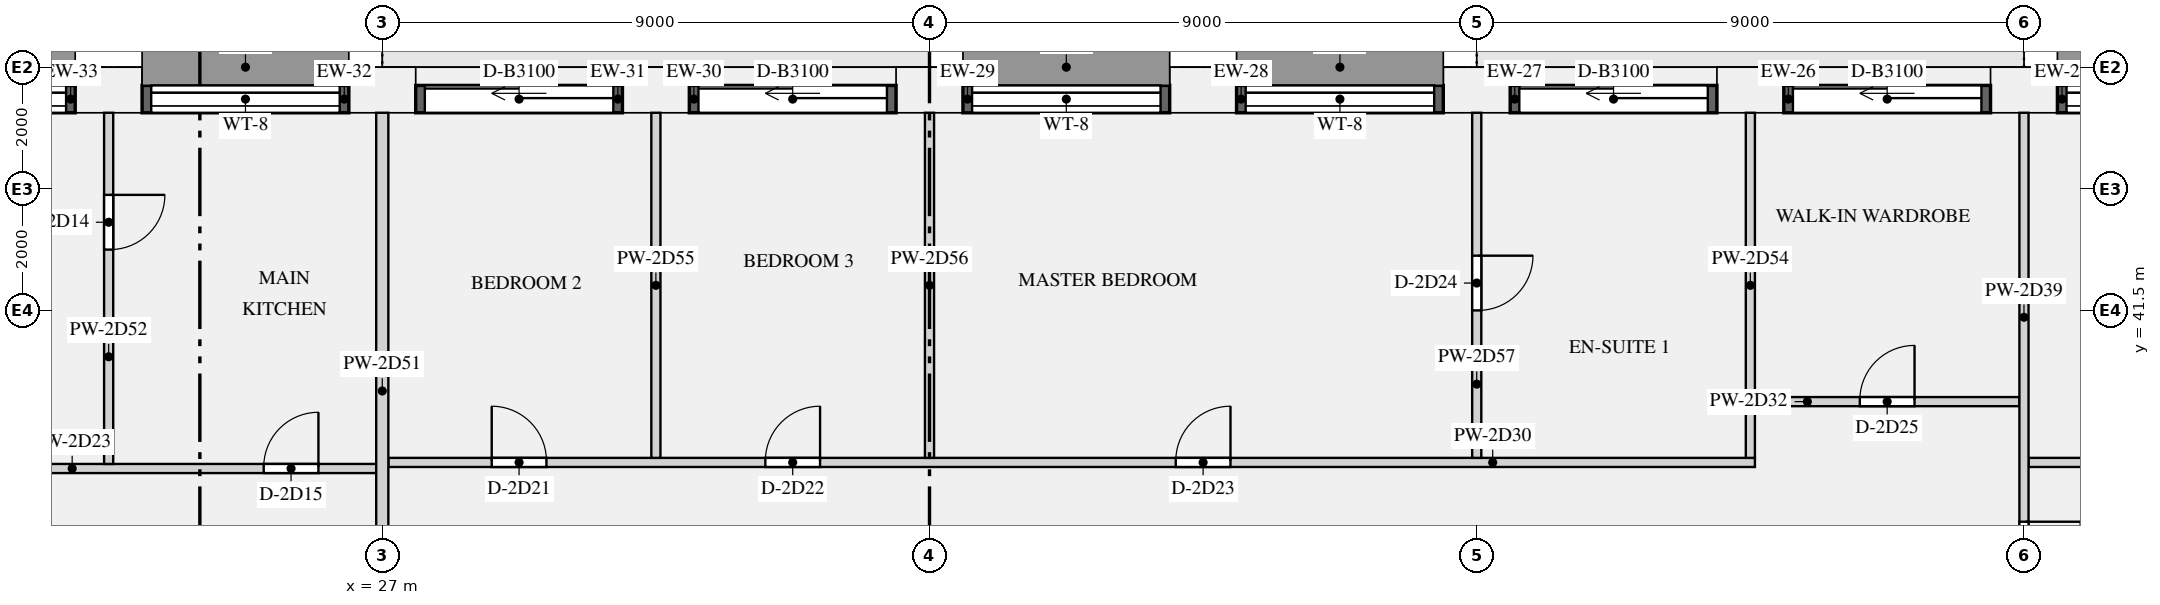
"""IFC4 building model, lengths in metres.
Left out: names, types, materials, properties, quantities, classifications, styles, units other than length and angle.
Written with IfcOpenShell. Run it as: python <this file> out.ifc"""

import sys

from ifc_helpers import new_model, si_unit, direction, frame, frame_2d, origin, origin_2d, place, context, subcontext, project, spatial, rectangle, extrude, element, fill, save


model = new_model("IFC4")
c1 = context("Model", 3, precision=1e-05, world=origin(), true_north=direction((0.0, 1.0)))
c2 = subcontext(c1, "Body", "Model", "MODEL_VIEW")
j1 = project(units=[si_unit("LENGTHUNIT", "METRE"), si_unit("PLANEANGLEUNIT", "RADIAN")], contexts=[c1])
p1 = place(None, origin())
s1 = spatial("IfcSite", under=j1, at=p1, CompositionType="ELEMENT")
p2 = place(p1, origin())
s2 = spatial("IfcBuilding", under=s1, at=p2, CompositionType="ELEMENT")
p3 = place(p2, frame((0.0, 0.0, 111.9)))
s3 = spatial("IfcBuildingStorey", under=s2, at=p3, CompositionType="ELEMENT", Elevation=111.9)
for number, where, z_axis, x_axis in (
    (1, (54.0, 45.125, 0.0), (0.0, 0.0, 1.0), (-1.0, 0.0, 0.0)),
    (2, (49.5, 45.125, 0.0), (0.0, 0.0, 1.0), (-1.0, 0.0, 0.0)),
    (3, (45.0, 45.125, 0.0), (0.0, 0.0, 1.0), (-1.0, 0.0, 0.0)),
    (4, (40.5, 45.125, 0.0), (0.0, 0.0, 1.0), (-1.0, 0.0, 0.0)),
    (5, (36.0, 45.125, 0.0), (0.0, 0.0, 1.0), (-1.0, 0.0, 0.0)),
    (6, (31.5, 45.125, 0.0), (0.0, 0.0, 1.0), (-1.0, 0.0, 0.0)),
    (7, (27.0, 45.125, 0.0), (0.0, 0.0, 1.0), (-1.0, 0.0, 0.0)),
    (8, (22.5, 45.125, 0.0), (0.0, 0.0, 1.0), (-1.0, 0.0, 0.0)),
):
    element("IfcColumn", number, at=place(p3, frame(where, z_axis=z_axis, x_axis=x_axis)), inside=s3, PredefinedType="USERDEFINED", context=c2, shape_type="SweptSolid", body=[
        extrude(rectangle(XDim=1.1, YDim=0.75, at=origin_2d()), origin(), (0.0, 0.0, 1.0), 3.15),
    ])
p4 = place(p3, frame((57.95, 44.975, 0.9), z_axis=(0.0, 0.0, 1.0), x_axis=(-1.0, 0.0, 0.0)))
e9 = element("IfcWall", 9, at=p4, inside=s3, PredefinedType="SOLIDWALL", context=c2, shape_type="SweptSolid", body=[
    extrude(rectangle(XDim=3.4, YDim=0.45, at=frame_2d((1.7, 0.0))), origin(), (0.0, 0.0, 1.0), 1.93),
])
p5 = place(p4, frame((0.15, 0.0, 0.15)))
e10 = element("IfcOpeningElement", 10, at=p5, cuts=e9, PredefinedType="OPENING", context=c2, shape_type="SweptSolid", body=[
    extrude(rectangle(XDim=3.1, YDim=1.5, at=frame_2d((1.55, 0.75))), frame((0.0, 0.235, 0.0), z_axis=(0.0, -1.0, 0.0), x_axis=(1.0, 0.0, 0.0)), (0.0, 0.0, 1.0), 0.47),
])
p6 = place(p3, frame((53.45, 44.975, 0.0), z_axis=(0.0, 0.0, 1.0), x_axis=(-1.0, 0.0, 0.0)))
e11 = element("IfcWall", 11, at=p6, inside=s3, PredefinedType="SOLIDWALL", context=c2, shape_type="SweptSolid", body=[
    extrude(rectangle(XDim=3.4, YDim=0.45, at=frame_2d((1.7, 0.0))), origin(), (0.0, 0.0, 1.0), 2.83),
])
p7 = place(p6, frame((0.15, 0.0, 0.0)))
e12 = element("IfcOpeningElement", 12, at=p7, cuts=e11, PredefinedType="OPENING", context=c2, shape_type="SweptSolid", body=[
    extrude(rectangle(XDim=3.1, YDim=2.3, at=frame_2d((1.55, 1.15))), frame((0.0, 0.235, 0.0), z_axis=(0.0, -1.0, 0.0), x_axis=(1.0, 0.0, 0.0)), (0.0, 0.0, 1.0), 0.47),
])
p8 = place(p3, frame((48.95, 44.975, 0.0), z_axis=(0.0, 0.0, 1.0), x_axis=(-1.0, 0.0, 0.0)))
e13 = element("IfcWall", 13, at=p8, inside=s3, PredefinedType="SOLIDWALL", context=c2, shape_type="SweptSolid", body=[
    extrude(rectangle(XDim=3.4, YDim=0.45, at=frame_2d((1.7, 0.0))), origin(), (0.0, 0.0, 1.0), 2.83),
])
p9 = place(p8, frame((0.15, 0.0, 0.0)))
e14 = element("IfcOpeningElement", 14, at=p9, cuts=e13, PredefinedType="OPENING", context=c2, shape_type="SweptSolid", body=[
    extrude(rectangle(XDim=3.1, YDim=2.3, at=frame_2d((1.55, 1.15))), frame((0.0, 0.235, 0.0), z_axis=(0.0, -1.0, 0.0), x_axis=(1.0, 0.0, 0.0)), (0.0, 0.0, 1.0), 0.47),
])
p10 = place(p3, frame((44.45, 44.975, 0.9), z_axis=(0.0, 0.0, 1.0), x_axis=(-1.0, 0.0, 0.0)))
e15 = element("IfcWall", 15, at=p10, inside=s3, PredefinedType="SOLIDWALL", context=c2, shape_type="SweptSolid", body=[
    extrude(rectangle(XDim=3.4, YDim=0.45, at=frame_2d((1.7, 0.0))), origin(), (0.0, 0.0, 1.0), 1.93),
])
p11 = place(p10, frame((0.15, 0.0, 0.15)))
e16 = element("IfcOpeningElement", 16, at=p11, cuts=e15, PredefinedType="OPENING", context=c2, shape_type="SweptSolid", body=[
    extrude(rectangle(XDim=3.1, YDim=1.5, at=frame_2d((1.55, 0.75))), frame((0.0, 0.235, 0.0), z_axis=(0.0, -1.0, 0.0), x_axis=(1.0, 0.0, 0.0)), (0.0, 0.0, 1.0), 0.47),
])
p12 = place(p3, frame((39.95, 44.975, 0.9), z_axis=(0.0, 0.0, 1.0), x_axis=(-1.0, 0.0, 0.0)))
e17 = element("IfcWall", 17, at=p12, inside=s3, PredefinedType="SOLIDWALL", context=c2, shape_type="SweptSolid", body=[
    extrude(rectangle(XDim=3.4, YDim=0.45, at=frame_2d((1.7, 0.0))), origin(), (0.0, 0.0, 1.0), 1.93),
])
p13 = place(p12, frame((0.15, 0.0, 0.15)))
e18 = element("IfcOpeningElement", 18, at=p13, cuts=e17, PredefinedType="OPENING", context=c2, shape_type="SweptSolid", body=[
    extrude(rectangle(XDim=3.1, YDim=1.5, at=frame_2d((1.55, 0.75))), frame((0.0, 0.235, 0.0), z_axis=(0.0, -1.0, 0.0), x_axis=(1.0, 0.0, 0.0)), (0.0, 0.0, 1.0), 0.47),
])
p14 = place(p3, frame((35.45, 44.975, 0.0), z_axis=(0.0, 0.0, 1.0), x_axis=(-1.0, 0.0, 0.0)))
e19 = element("IfcWall", 19, at=p14, inside=s3, PredefinedType="SOLIDWALL", context=c2, shape_type="SweptSolid", body=[
    extrude(rectangle(XDim=3.4, YDim=0.45, at=frame_2d((1.7, 0.0))), origin(), (0.0, 0.0, 1.0), 2.83),
])
p15 = place(p14, frame((0.15, 0.0, 0.0)))
e20 = element("IfcOpeningElement", 20, at=p15, cuts=e19, PredefinedType="OPENING", context=c2, shape_type="SweptSolid", body=[
    extrude(rectangle(XDim=3.1, YDim=2.3, at=frame_2d((1.55, 1.15))), frame((0.0, 0.235, 0.0), z_axis=(0.0, -1.0, 0.0), x_axis=(1.0, 0.0, 0.0)), (0.0, 0.0, 1.0), 0.47),
])
p16 = place(p3, frame((30.95, 44.975, 0.0), z_axis=(0.0, 0.0, 1.0), x_axis=(-1.0, 0.0, 0.0)))
e21 = element("IfcWall", 21, at=p16, inside=s3, PredefinedType="SOLIDWALL", context=c2, shape_type="SweptSolid", body=[
    extrude(rectangle(XDim=3.4, YDim=0.45, at=frame_2d((1.7, 0.0))), origin(), (0.0, 0.0, 1.0), 2.83),
])
p17 = place(p16, frame((0.15, 0.0, 0.0)))
e22 = element("IfcOpeningElement", 22, at=p17, cuts=e21, PredefinedType="OPENING", context=c2, shape_type="SweptSolid", body=[
    extrude(rectangle(XDim=3.1, YDim=2.3, at=frame_2d((1.55, 1.15))), frame((0.0, 0.235, 0.0), z_axis=(0.0, -1.0, 0.0), x_axis=(1.0, 0.0, 0.0)), (0.0, 0.0, 1.0), 0.47),
])
p18 = place(p3, frame((26.45, 44.975, 0.9), z_axis=(0.0, 0.0, 1.0), x_axis=(-1.0, 0.0, 0.0)))
e23 = element("IfcWall", 23, at=p18, inside=s3, PredefinedType="SOLIDWALL", context=c2, shape_type="SweptSolid", body=[
    extrude(rectangle(XDim=3.4, YDim=0.45, at=frame_2d((1.7, 0.0))), origin(), (0.0, 0.0, 1.0), 1.93),
])
p19 = place(p18, frame((0.15, 0.0, 0.15)))
e24 = element("IfcOpeningElement", 24, at=p19, cuts=e23, PredefinedType="OPENING", context=c2, shape_type="SweptSolid", body=[
    extrude(rectangle(XDim=3.1, YDim=1.5, at=frame_2d((1.55, 0.75))), frame((0.0, 0.235, 0.0), z_axis=(0.0, -1.0, 0.0), x_axis=(1.0, 0.0, 0.0)), (0.0, 0.0, 1.0), 0.47),
])
p20 = place(p3, frame((21.95, 44.975, 0.9), z_axis=(0.0, 0.0, 1.0), x_axis=(-1.0, 0.0, 0.0)))
e25 = element("IfcWall", 25, at=p20, inside=s3, PredefinedType="SOLIDWALL", context=c2, shape_type="SweptSolid", body=[
    extrude(rectangle(XDim=3.4, YDim=0.45, at=frame_2d((1.7, 0.0))), origin(), (0.0, 0.0, 1.0), 1.93),
])
p21 = place(p20, frame((0.15, 0.0, 0.15)))
e26 = element("IfcOpeningElement", 26, at=p21, cuts=e25, PredefinedType="OPENING", context=c2, shape_type="SweptSolid", body=[
    extrude(rectangle(XDim=3.1, YDim=1.5, at=frame_2d((1.55, 0.75))), frame((0.0, 0.235, 0.0), z_axis=(0.0, -1.0, 0.0), x_axis=(1.0, 0.0, 0.0)), (0.0, 0.0, 1.0), 0.47),
])
p22 = place(p3, frame((13.425, 38.9, 0.0), z_axis=(0.0, 0.0, 1.0), x_axis=(1.0, 0.0, 0.0)))
e27 = element("IfcWall", 27, at=p22, inside=s3, PredefinedType="PARTITIONING", context=c2, shape_type="SweptSolid", body=[
    extrude(rectangle(XDim=13.475, YDim=0.15, at=frame_2d((6.737, 0.0))), origin(), (0.0, 0.0, 1.0), 2.83),
])
p23 = place(p22, frame((3.825, 0.0, 0.0)))
e28 = element("IfcOpeningElement", 28, at=p23, cuts=e27, PredefinedType="OPENING", context=c2, shape_type="SweptSolid", body=[
    extrude(rectangle(XDim=1.5, YDim=2.1, at=frame_2d((0.75, 1.05))), frame((0.0, 0.085, 0.0), z_axis=(0.0, -1.0, 0.0), x_axis=(1.0, 0.0, 0.0)), (0.0, 0.0, 1.0), 0.17),
])
p24 = place(p22, frame((11.625, 0.0, 0.0)))
e29 = element("IfcOpeningElement", 29, at=p24, cuts=e27, PredefinedType="OPENING", context=c2, shape_type="SweptSolid", body=[
    extrude(rectangle(XDim=0.9, YDim=2.1, at=frame_2d((0.45, 1.05))), frame((0.0, 0.085, 0.0), z_axis=(0.0, -1.0, 0.0), x_axis=(1.0, 0.0, 0.0)), (0.0, 0.0, 1.0), 0.17),
])
p25 = place(p3, frame((27.1, 39.0, 0.0), z_axis=(0.0, 0.0, 1.0), x_axis=(1.0, 0.0, 0.0)))
e30 = element("IfcWall", 30, at=p25, inside=s3, PredefinedType="PARTITIONING", context=c2, shape_type="SweptSolid", body=[
    extrude(rectangle(XDim=22.475, YDim=0.15, at=frame_2d((11.237, 0.0))), origin(), (0.0, 0.0, 1.0), 2.83),
])
p26 = place(p25, frame((1.7, 0.0, 0.0)))
e31 = element("IfcOpeningElement", 31, at=p26, cuts=e30, PredefinedType="OPENING", context=c2, shape_type="SweptSolid", body=[
    extrude(rectangle(XDim=0.9, YDim=2.1, at=frame_2d((0.45, 1.05))), frame((0.0, 0.085, 0.0), z_axis=(0.0, -1.0, 0.0), x_axis=(1.0, 0.0, 0.0)), (0.0, 0.0, 1.0), 0.17),
])
p27 = place(p25, frame((6.2, 0.0, 0.0)))
e32 = element("IfcOpeningElement", 32, at=p27, cuts=e30, PredefinedType="OPENING", context=c2, shape_type="SweptSolid", body=[
    extrude(rectangle(XDim=0.9, YDim=2.1, at=frame_2d((0.45, 1.05))), frame((0.0, 0.085, 0.0), z_axis=(0.0, -1.0, 0.0), x_axis=(1.0, 0.0, 0.0)), (0.0, 0.0, 1.0), 0.17),
])
p28 = place(p25, frame((12.95, 0.0, 0.0)))
e33 = element("IfcOpeningElement", 33, at=p28, cuts=e30, PredefinedType="OPENING", context=c2, shape_type="SweptSolid", body=[
    extrude(rectangle(XDim=0.9, YDim=2.1, at=frame_2d((0.45, 1.05))), frame((0.0, 0.085, 0.0), z_axis=(0.0, -1.0, 0.0), x_axis=(1.0, 0.0, 0.0)), (0.0, 0.0, 1.0), 0.17),
])
p29 = place(p3, frame((54.075, 39.0, 0.0), z_axis=(0.0, 0.0, 1.0), x_axis=(1.0, 0.0, 0.0)))
e34 = element("IfcWall", 34, at=p29, inside=s3, PredefinedType="PARTITIONING", context=c2, shape_type="SweptSolid", body=[
    extrude(rectangle(XDim=8.85, YDim=0.15, at=frame_2d((4.425, 0.0))), origin(), (0.0, 0.0, 1.0), 2.83),
])
p30 = place(p29, frame((3.975, 0.0, 0.0)))
e35 = element("IfcOpeningElement", 35, at=p30, cuts=e34, PredefinedType="OPENING", context=c2, shape_type="SweptSolid", body=[
    extrude(rectangle(XDim=0.9, YDim=2.1, at=frame_2d((0.45, 1.05))), frame((0.0, 0.085, 0.0), z_axis=(0.0, -1.0, 0.0), x_axis=(1.0, 0.0, 0.0)), (0.0, 0.0, 1.0), 0.17),
])
p31 = place(p3, frame((49.575, 40.0, 0.0), z_axis=(0.0, 0.0, 1.0), x_axis=(1.0, 0.0, 0.0)))
e36 = element("IfcWall", 36, at=p31, inside=s3, PredefinedType="PARTITIONING", context=c2, shape_type="SweptSolid", body=[
    extrude(rectangle(XDim=4.35, YDim=0.15, at=frame_2d((2.175, 0.0))), origin(), (0.0, 0.0, 1.0), 2.83),
])
p32 = place(p31, frame((1.725, 0.0, 0.0)))
e37 = element("IfcOpeningElement", 37, at=p32, cuts=e36, PredefinedType="OPENING", context=c2, shape_type="SweptSolid", body=[
    extrude(rectangle(XDim=0.9, YDim=2.1, at=frame_2d((0.45, 1.05))), frame((0.0, 0.085, 0.0), z_axis=(0.0, -1.0, 0.0), x_axis=(1.0, 0.0, 0.0)), (0.0, 0.0, 1.0), 0.17),
])
p33 = place(p3, frame((54.0, 35.475, 0.0), z_axis=(0.0, 0.0, 1.0), x_axis=(0.0, 1.0, 0.0)))
e38 = element("IfcWall", 38, at=p33, inside=s3, PredefinedType="PARTITIONING", context=c2, shape_type="SweptSolid", body=[
    extrude(rectangle(XDim=9.275, YDim=0.15, at=frame_2d((4.637, 0.0))), origin(), (0.0, 0.0, 1.0), 2.83),
])
p34 = place(p33, frame((1.65, 0.0, 0.0)))
e39 = element("IfcOpeningElement", 39, at=p34, cuts=e38, PredefinedType="OPENING", context=c2, shape_type="SweptSolid", body=[
    extrude(rectangle(XDim=0.9, YDim=2.1, at=frame_2d((0.45, 1.05))), frame((0.0, 0.085, 0.0), z_axis=(0.0, -1.0, 0.0), x_axis=(1.0, 0.0, 0.0)), (0.0, 0.0, 1.0), 0.17),
])
p35 = place(p3, frame((27.0, 35.6, 0.0), z_axis=(0.0, 0.0, 1.0), x_axis=(0.0, 1.0, 0.0)))
e40 = element("IfcWall", 40, at=p35, inside=s3, PredefinedType="PARTITIONING", context=c2, shape_type="SweptSolid", body=[
    extrude(rectangle(XDim=9.15, YDim=0.2, at=frame_2d((4.575, 0.0))), origin(), (0.0, 0.0, 1.0), 2.83),
])
p36 = place(p3, frame((22.5, 38.975, 0.0), z_axis=(0.0, 0.0, 1.0), x_axis=(0.0, 1.0, 0.0)))
e41 = element("IfcWall", 41, at=p36, inside=s3, PredefinedType="PARTITIONING", context=c2, shape_type="SweptSolid", body=[
    extrude(rectangle(XDim=5.775, YDim=0.15, at=frame_2d((2.887, 0.0))), origin(), (0.0, 0.0, 1.0), 2.83),
])
p37 = place(p36, frame((3.525, 0.0, 0.0)))
e42 = element("IfcOpeningElement", 42, at=p37, cuts=e41, PredefinedType="OPENING", context=c2, shape_type="SweptSolid", body=[
    extrude(rectangle(XDim=0.9, YDim=2.1, at=frame_2d((0.45, 1.05))), frame((0.0, 0.085, 0.0), z_axis=(0.0, -1.0, 0.0), x_axis=(1.0, 0.0, 0.0)), (0.0, 0.0, 1.0), 0.17),
])
for number, where, z_axis, x_axis in (
    (43, (49.5, 39.075, 0.0), (0.0, 0.0, 1.0), (0.0, 1.0, 0.0)),
    (44, (31.5, 39.075, 0.0), (0.0, 0.0, 1.0), (0.0, 1.0, 0.0)),
    (45, (36.0, 39.075, 0.0), (0.0, 0.0, 1.0), (0.0, 1.0, 0.0)),
):
    element("IfcWall", number, at=place(p3, frame(where, z_axis=z_axis, x_axis=x_axis)), inside=s3, PredefinedType="PARTITIONING", context=c2, shape_type="SweptSolid", body=[
        extrude(rectangle(XDim=5.675, YDim=0.15, at=frame_2d((2.837, 0.0))), origin(), (0.0, 0.0, 1.0), 2.83),
    ])
p38 = place(p3, frame((45.0, 39.075, 0.0), z_axis=(0.0, 0.0, 1.0), x_axis=(0.0, 1.0, 0.0)))
e46 = element("IfcWall", 46, at=p38, inside=s3, PredefinedType="PARTITIONING", context=c2, shape_type="SweptSolid", body=[
    extrude(rectangle(XDim=5.675, YDim=0.15, at=frame_2d((2.837, 0.0))), origin(), (0.0, 0.0, 1.0), 2.83),
])
p39 = place(p38, frame((2.425, 0.0, 0.0)))
e47 = element("IfcOpeningElement", 47, at=p39, cuts=e46, PredefinedType="OPENING", context=c2, shape_type="SweptSolid", body=[
    extrude(rectangle(XDim=0.9, YDim=2.1, at=frame_2d((0.45, 1.05))), frame((0.0, 0.085, 0.0), z_axis=(0.0, -1.0, 0.0), x_axis=(1.0, 0.0, 0.0)), (0.0, 0.0, 1.0), 0.17),
])
p40 = place(p5, origin())
e48 = element("IfcWindow", 48, at=p40, inside=s3, PartitioningType="SINGLE_PANEL", PredefinedType="WINDOW", context=c2, shape_type="SweptSolid", body=[
    extrude(rectangle(XDim=3.1, YDim=1.5, at=frame_2d((1.55, 0.75))), frame((0.0, -0.065, 0.0), z_axis=(0.0, -1.0, 0.0), x_axis=(1.0, 0.0, 0.0)), (0.0, 0.0, 1.0), 0.06),
])
fill(e10, e48)
p41 = place(p7, origin())
e49 = element("IfcDoor", 49, at=p41, inside=s3, OperationType="SLIDING_TO_LEFT", PredefinedType="DOOR", context=c2, shape_type="SweptSolid", body=[
    extrude(rectangle(XDim=3.1, YDim=2.3, at=frame_2d((1.55, 1.15))), frame((0.0, -0.07, 0.0), z_axis=(0.0, -1.0, 0.0), x_axis=(1.0, 0.0, 0.0)), (0.0, 0.0, 1.0), 0.05),
])
fill(e12, e49)
p42 = place(p9, origin())
e50 = element("IfcDoor", 50, at=p42, inside=s3, OperationType="SLIDING_TO_LEFT", PredefinedType="DOOR", context=c2, shape_type="SweptSolid", body=[
    extrude(rectangle(XDim=3.1, YDim=2.3, at=frame_2d((1.55, 1.15))), frame((0.0, -0.07, 0.0), z_axis=(0.0, -1.0, 0.0), x_axis=(1.0, 0.0, 0.0)), (0.0, 0.0, 1.0), 0.05),
])
fill(e14, e50)
p43 = place(p11, origin())
e51 = element("IfcWindow", 51, at=p43, inside=s3, PartitioningType="SINGLE_PANEL", PredefinedType="WINDOW", context=c2, shape_type="SweptSolid", body=[
    extrude(rectangle(XDim=3.1, YDim=1.5, at=frame_2d((1.55, 0.75))), frame((0.0, -0.065, 0.0), z_axis=(0.0, -1.0, 0.0), x_axis=(1.0, 0.0, 0.0)), (0.0, 0.0, 1.0), 0.06),
])
fill(e16, e51)
p44 = place(p13, origin())
e52 = element("IfcWindow", 52, at=p44, inside=s3, PartitioningType="SINGLE_PANEL", PredefinedType="WINDOW", context=c2, shape_type="SweptSolid", body=[
    extrude(rectangle(XDim=3.1, YDim=1.5, at=frame_2d((1.55, 0.75))), frame((0.0, -0.065, 0.0), z_axis=(0.0, -1.0, 0.0), x_axis=(1.0, 0.0, 0.0)), (0.0, 0.0, 1.0), 0.06),
])
fill(e18, e52)
p45 = place(p15, origin())
e53 = element("IfcDoor", 53, at=p45, inside=s3, OperationType="SLIDING_TO_LEFT", PredefinedType="DOOR", context=c2, shape_type="SweptSolid", body=[
    extrude(rectangle(XDim=3.1, YDim=2.3, at=frame_2d((1.55, 1.15))), frame((0.0, -0.07, 0.0), z_axis=(0.0, -1.0, 0.0), x_axis=(1.0, 0.0, 0.0)), (0.0, 0.0, 1.0), 0.05),
])
fill(e20, e53)
p46 = place(p17, origin())
e54 = element("IfcDoor", 54, at=p46, inside=s3, OperationType="SLIDING_TO_LEFT", PredefinedType="DOOR", context=c2, shape_type="SweptSolid", body=[
    extrude(rectangle(XDim=3.1, YDim=2.3, at=frame_2d((1.55, 1.15))), frame((0.0, -0.07, 0.0), z_axis=(0.0, -1.0, 0.0), x_axis=(1.0, 0.0, 0.0)), (0.0, 0.0, 1.0), 0.05),
])
fill(e22, e54)
p47 = place(p19, origin())
e55 = element("IfcWindow", 55, at=p47, inside=s3, PartitioningType="SINGLE_PANEL", PredefinedType="WINDOW", context=c2, shape_type="SweptSolid", body=[
    extrude(rectangle(XDim=3.1, YDim=1.5, at=frame_2d((1.55, 0.75))), frame((0.0, -0.065, 0.0), z_axis=(0.0, -1.0, 0.0), x_axis=(1.0, 0.0, 0.0)), (0.0, 0.0, 1.0), 0.06),
])
fill(e24, e55)
p48 = place(p21, origin())
e56 = element("IfcWindow", 56, at=p48, inside=s3, PartitioningType="SINGLE_PANEL", PredefinedType="WINDOW", context=c2, shape_type="SweptSolid", body=[
    extrude(rectangle(XDim=3.1, YDim=1.5, at=frame_2d((1.55, 0.75))), frame((0.0, -0.065, 0.0), z_axis=(0.0, -1.0, 0.0), x_axis=(1.0, 0.0, 0.0)), (0.0, 0.0, 1.0), 0.06),
])
fill(e26, e56)
p49 = place(p37, frame((0.9, 0.0, 0.0), z_axis=(0.0, 0.0, 1.0), x_axis=(-1.0, 0.0, 0.0)))
e57 = element("IfcDoor", 57, at=p49, inside=s3, OperationType="SINGLE_SWING_LEFT", PredefinedType="DOOR", context=c2, shape_type="SweptSolid", body=[
    extrude(rectangle(XDim=0.9, YDim=2.1, at=frame_2d((0.45, 1.05))), frame((0.0, 0.025, 0.0), z_axis=(0.0, -1.0, 0.0), x_axis=(1.0, 0.0, 0.0)), (0.0, 0.0, 1.0), 0.05),
])
fill(e42, e57)
p50 = place(p24, origin())
e58 = element("IfcDoor", 58, at=p50, inside=s3, OperationType="SINGLE_SWING_RIGHT", PredefinedType="DOOR", context=c2, shape_type="SweptSolid", body=[
    extrude(rectangle(XDim=0.9, YDim=2.1, at=frame_2d((0.45, 1.05))), frame((0.0, 0.025, 0.0), z_axis=(0.0, -1.0, 0.0), x_axis=(1.0, 0.0, 0.0)), (0.0, 0.0, 1.0), 0.05),
])
fill(e29, e58)
p51 = place(p26, origin())
e59 = element("IfcDoor", 59, at=p51, inside=s3, OperationType="SINGLE_SWING_LEFT", PredefinedType="DOOR", context=c2, shape_type="SweptSolid", body=[
    extrude(rectangle(XDim=0.9, YDim=2.1, at=frame_2d((0.45, 1.05))), frame((0.0, 0.025, 0.0), z_axis=(0.0, -1.0, 0.0), x_axis=(1.0, 0.0, 0.0)), (0.0, 0.0, 1.0), 0.05),
])
fill(e31, e59)
p52 = place(p27, origin())
e60 = element("IfcDoor", 60, at=p52, inside=s3, OperationType="SINGLE_SWING_RIGHT", PredefinedType="DOOR", context=c2, shape_type="SweptSolid", body=[
    extrude(rectangle(XDim=0.9, YDim=2.1, at=frame_2d((0.45, 1.05))), frame((0.0, 0.025, 0.0), z_axis=(0.0, -1.0, 0.0), x_axis=(1.0, 0.0, 0.0)), (0.0, 0.0, 1.0), 0.05),
])
fill(e32, e60)
p53 = place(p28, origin())
e61 = element("IfcDoor", 61, at=p53, inside=s3, OperationType="SINGLE_SWING_RIGHT", PredefinedType="DOOR", context=c2, shape_type="SweptSolid", body=[
    extrude(rectangle(XDim=0.9, YDim=2.1, at=frame_2d((0.45, 1.05))), frame((0.0, 0.025, 0.0), z_axis=(0.0, -1.0, 0.0), x_axis=(1.0, 0.0, 0.0)), (0.0, 0.0, 1.0), 0.05),
])
fill(e33, e61)
p54 = place(p39, frame((0.9, 0.0, 0.0), z_axis=(0.0, 0.0, 1.0), x_axis=(-1.0, 0.0, 0.0)))
e62 = element("IfcDoor", 62, at=p54, inside=s3, OperationType="SINGLE_SWING_LEFT", PredefinedType="DOOR", context=c2, shape_type="SweptSolid", body=[
    extrude(rectangle(XDim=0.9, YDim=2.1, at=frame_2d((0.45, 1.05))), frame((0.0, 0.025, 0.0), z_axis=(0.0, -1.0, 0.0), x_axis=(1.0, 0.0, 0.0)), (0.0, 0.0, 1.0), 0.05),
])
fill(e47, e62)
p55 = place(p32, origin())
e63 = element("IfcDoor", 63, at=p55, inside=s3, OperationType="SINGLE_SWING_RIGHT", PredefinedType="DOOR", context=c2, shape_type="SweptSolid", body=[
    extrude(rectangle(XDim=0.9, YDim=2.1, at=frame_2d((0.45, 1.05))), frame((0.0, 0.025, 0.0), z_axis=(0.0, -1.0, 0.0), x_axis=(1.0, 0.0, 0.0)), (0.0, 0.0, 1.0), 0.05),
])
fill(e37, e63)
p56 = place(p34, frame((0.9, 0.0, 0.0), z_axis=(0.0, 0.0, 1.0), x_axis=(-1.0, 0.0, 0.0)))
e64 = element("IfcDoor", 64, at=p56, inside=s3, OperationType="SINGLE_SWING_LEFT", PredefinedType="DOOR", context=c2, shape_type="SweptSolid", body=[
    extrude(rectangle(XDim=0.9, YDim=2.1, at=frame_2d((0.45, 1.05))), frame((0.0, 0.025, 0.0), z_axis=(0.0, -1.0, 0.0), x_axis=(1.0, 0.0, 0.0)), (0.0, 0.0, 1.0), 0.05),
])
fill(e39, e64)
save(model, sys.argv[1])
